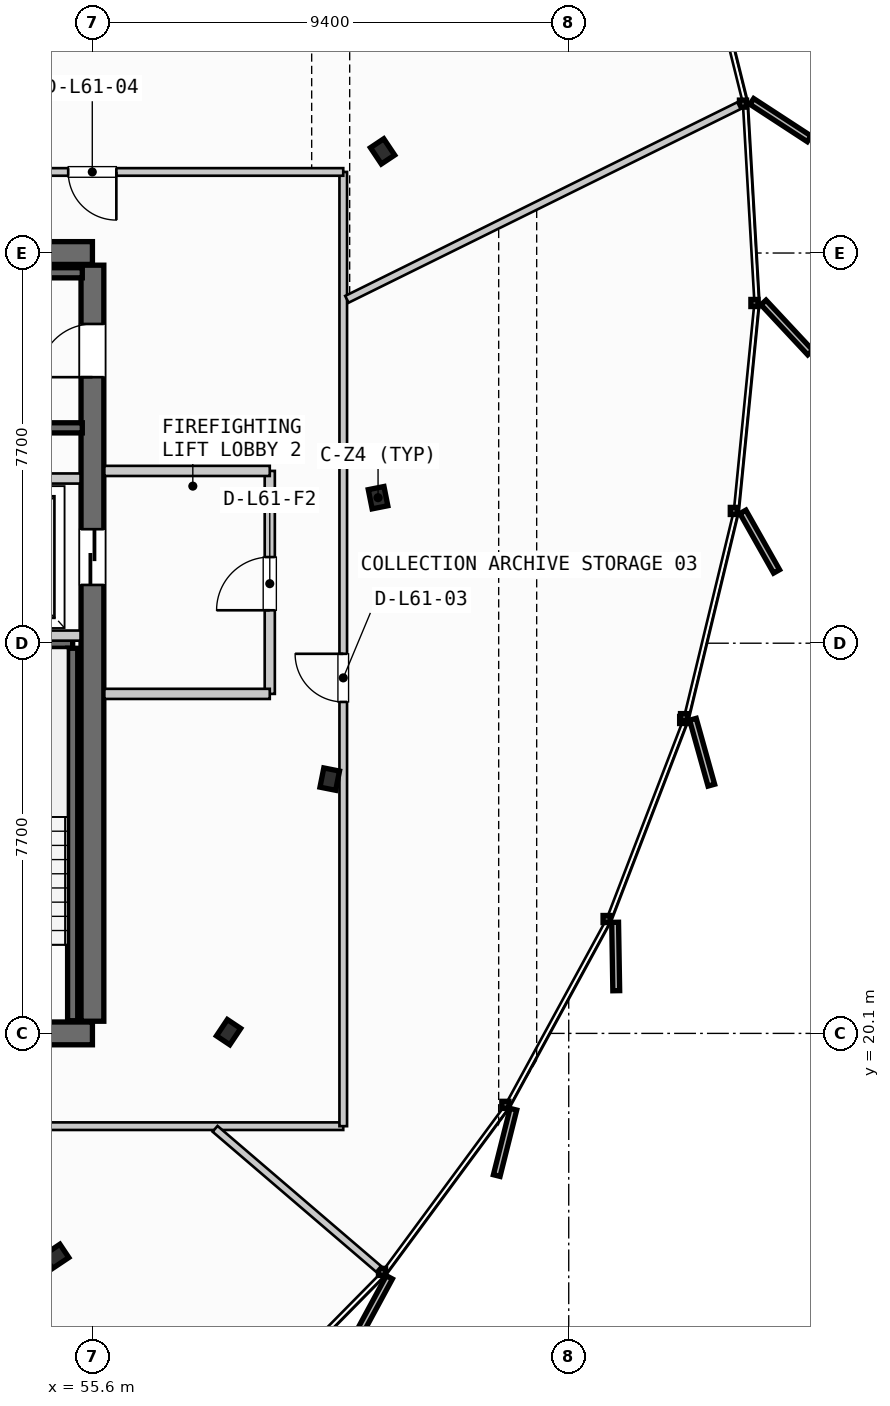
"""IFC4 building model, lengths in metres.
Left out: names, types, materials, properties, quantities, classifications, styles, units other than length and angle.
Written with IfcOpenShell. Run it as: python <this file> out.ifc"""

import sys

from ifc_helpers import new_model, si_unit, direction, frame, frame_2d, origin, origin_2d, place, context, subcontext, project, spatial, rectangle, i_section, extrude, source, transform, mapped, element, fill, save


model = new_model("IFC4")
c1 = context("Model", 3, precision=1e-05, world=origin(), true_north=direction((0.0, 1.0)))
c2 = subcontext(c1, "Body", "Model", "MODEL_VIEW")
j1 = project(units=[si_unit("LENGTHUNIT", "METRE"), si_unit("PLANEANGLEUNIT", "RADIAN")], contexts=[c1])
p1 = place(None, origin())
s1 = spatial("IfcSite", under=j1, at=p1, CompositionType="ELEMENT")
p2 = place(p1, origin())
s2 = spatial("IfcBuilding", under=s1, at=p2, CompositionType="ELEMENT")
p3 = place(p2, frame((0.0, 0.0, 235.3)))
s3 = spatial("IfcBuildingStorey", under=s2, at=p3, CompositionType="ELEMENT", Elevation=235.3)
p4 = place(p3, frame((38.0, 20.1, 0.0), z_axis=(0.0, 0.0, 1.0), x_axis=(1.0, 0.0, 0.0)))
e1 = element("IfcWall", 1, at=p4, inside=s3, PredefinedType="SHEAR", context=c2, shape_type="SweptSolid", body=[
    extrude(rectangle(XDim=17.6, YDim=0.45, at=frame_2d((8.8, 0.0))), origin(), (0.0, 0.0, 1.0), 3.21),
])
p5 = place(p4, frame((1.4, 0.0, 0.0)))
e2 = element("IfcOpeningElement", 2, at=p5, cuts=e1, PredefinedType="OPENING", context=c2, shape_type="SweptSolid", body=[
    extrude(rectangle(XDim=1.05, YDim=2.15, at=frame_2d((0.525, 1.075))), frame((0.0, 0.235, 0.0), z_axis=(0.0, -1.0, 0.0), x_axis=(1.0, 0.0, 0.0)), (0.0, 0.0, 1.0), 0.47),
])
p6 = place(p4, frame((15.15, 0.0, 0.0)))
e3 = element("IfcOpeningElement", 3, at=p6, cuts=e1, PredefinedType="OPENING", context=c2, shape_type="SweptSolid", body=[
    extrude(rectangle(XDim=1.05, YDim=2.15, at=frame_2d((0.525, 1.075))), frame((0.0, 0.235, 0.0), z_axis=(0.0, -1.0, 0.0), x_axis=(1.0, 0.0, 0.0)), (0.0, 0.0, 1.0), 0.47),
])
p7 = place(p4, frame((5.25, 0.0, 0.0)))
e4 = element("IfcOpeningElement", 4, at=p7, cuts=e1, PredefinedType="OPENING", context=c2, shape_type="SweptSolid", body=[
    extrude(rectangle(XDim=0.95, YDim=2.15, at=frame_2d((0.475, 1.075))), frame((0.0, 0.235, 0.0), z_axis=(0.0, -1.0, 0.0), x_axis=(1.0, 0.0, 0.0)), (0.0, 0.0, 1.0), 0.47),
])
p8 = place(p4, frame((11.4, 0.0, 0.0)))
e5 = element("IfcOpeningElement", 5, at=p8, cuts=e1, PredefinedType="OPENING", context=c2, shape_type="SweptSolid", body=[
    extrude(rectangle(XDim=0.95, YDim=2.15, at=frame_2d((0.475, 1.075))), frame((0.0, 0.235, 0.0), z_axis=(0.0, -1.0, 0.0), x_axis=(1.0, 0.0, 0.0)), (0.0, 0.0, 1.0), 0.47),
])
p9 = place(p3, frame((55.6, 35.5, 0.0), z_axis=(0.0, 0.0, 1.0), x_axis=(-1.0, 0.0, 0.0)))
e6 = element("IfcWall", 6, at=p9, inside=s3, PredefinedType="SHEAR", context=c2, shape_type="SweptSolid", body=[
    extrude(rectangle(XDim=17.6, YDim=0.45, at=frame_2d((8.8, 0.0))), origin(), (0.0, 0.0, 1.0), 3.21),
])
p10 = place(p9, frame((8.05, 0.0, 0.0)))
e7 = element("IfcOpeningElement", 7, at=p10, cuts=e6, PredefinedType="OPENING", context=c2, shape_type="SweptSolid", body=[
    extrude(rectangle(XDim=1.5, YDim=2.2, at=frame_2d((0.75, 1.1))), frame((0.0, 0.235, 0.0), z_axis=(0.0, -1.0, 0.0), x_axis=(1.0, 0.0, 0.0)), (0.0, 0.0, 1.0), 0.47),
])
p11 = place(p9, frame((15.85, 0.0, 0.0)))
e8 = element("IfcOpeningElement", 8, at=p11, cuts=e6, PredefinedType="OPENING", context=c2, shape_type="SweptSolid", body=[
    extrude(rectangle(XDim=0.85, YDim=2.15, at=frame_2d((0.425, 1.075))), frame((0.0, 0.235, 0.0), z_axis=(0.0, -1.0, 0.0), x_axis=(1.0, 0.0, 0.0)), (0.0, 0.0, 1.0), 0.47),
])
p12 = place(p9, frame((14.35, 0.0, 0.0)))
e9 = element("IfcOpeningElement", 9, at=p12, cuts=e6, PredefinedType="OPENING", context=c2, shape_type="SweptSolid", body=[
    extrude(rectangle(XDim=0.85, YDim=2.15, at=frame_2d((0.425, 1.075))), frame((0.0, 0.235, 0.0), z_axis=(0.0, -1.0, 0.0), x_axis=(1.0, 0.0, 0.0)), (0.0, 0.0, 1.0), 0.47),
])
p13 = place(p9, frame((12.3, 0.0, 0.0)))
e10 = element("IfcOpeningElement", 10, at=p13, cuts=e6, PredefinedType="OPENING", context=c2, shape_type="SweptSolid", body=[
    extrude(rectangle(XDim=0.95, YDim=2.15, at=frame_2d((0.475, 1.075))), frame((0.0, 0.235, 0.0), z_axis=(0.0, -1.0, 0.0), x_axis=(1.0, 0.0, 0.0)), (0.0, 0.0, 1.0), 0.47),
])
p14 = place(p9, frame((10.2, 0.0, 0.0)))
e11 = element("IfcOpeningElement", 11, at=p14, cuts=e6, PredefinedType="OPENING", context=c2, shape_type="SweptSolid", body=[
    extrude(rectangle(XDim=0.9, YDim=2.15, at=frame_2d((0.45, 1.075))), frame((0.0, 0.235, 0.0), z_axis=(0.0, -1.0, 0.0), x_axis=(1.0, 0.0, 0.0)), (0.0, 0.0, 1.0), 0.47),
])
p15 = place(p3, frame((55.6, 20.34, 0.0), z_axis=(0.0, 0.0, 1.0), x_axis=(0.0, 1.0, 0.0)))
e12 = element("IfcWall", 12, at=p15, inside=s3, PredefinedType="SHEAR", context=c2, shape_type="SweptSolid", body=[
    extrude(rectangle(XDim=14.92, YDim=0.45, at=frame_2d((7.46, 0.0))), origin(), (0.0, 0.0, 1.0), 3.21),
])
p16 = place(p15, frame((12.71, 0.0, 0.0)))
e13 = element("IfcOpeningElement", 13, at=p16, cuts=e12, PredefinedType="OPENING", context=c2, shape_type="SweptSolid", body=[
    extrude(rectangle(XDim=1.05, YDim=2.15, at=frame_2d((0.525, 1.075))), frame((0.0, 0.235, 0.0), z_axis=(0.0, -1.0, 0.0), x_axis=(1.0, 0.0, 0.0)), (0.0, 0.0, 1.0), 0.47),
])
p17 = place(p15, frame((8.61, 0.0, 0.0)))
e14 = element("IfcOpeningElement", 14, at=p17, cuts=e12, PredefinedType="OPENING", context=c2, shape_type="SweptSolid", body=[
    extrude(rectangle(XDim=1.1, YDim=2.2, at=frame_2d((0.55, 1.1))), frame((0.0, 0.235, 0.0), z_axis=(0.0, -1.0, 0.0), x_axis=(1.0, 0.0, 0.0)), (0.0, 0.0, 1.0), 0.47),
])
m1 = source(origin(), c2, "Body", "SweptSolid", [
    extrude(i_section(OverallWidth=0.387, OverallDepth=0.316, WebThickness=0.019, FlangeThickness=0.028, FilletRadius=0.015, at=origin_2d()), origin(), (0.0, 0.0, 1.0), 3.21),
])
for number, where, z_axis, x_axis in (
    (15, (61.237, 30.672, 0.0), (0.0, 0.0, 1.0), (0.981, 0.195, 0.0)),
    (16, (61.326, 37.506, 0.0), (0.0, 0.0, 1.0), (0.831, 0.556, 0.0)),
    (17, (54.885, 15.7, 0.0), (0.0, 0.0, 1.0), (0.556, -0.831, 0.0)),
    (18, (58.287, 20.125, 0.0), (0.0, 0.0, 1.0), (0.831, -0.556, 0.0)),
    (19, (60.284, 25.118, 0.0), (0.0, 0.0, 1.0), (0.981, -0.195, 0.0)),
):
    element("IfcColumn", number, at=place(p3, frame(where, z_axis=z_axis, x_axis=x_axis)), inside=s3, PredefinedType="COLUMN", context=c2, shape_type="MappedRepresentation", body=[
        mapped(m1, transform((0.0, 0.0, 0.0), scale=1.0)),
    ])
p18 = place(p3, frame((52.15, 27.8, 0.0), z_axis=(0.0, 0.0, 1.0), x_axis=(1.0, 0.0, 0.0)))
e20 = element("IfcWall", 20, at=p18, inside=s3, PredefinedType="SHEAR", context=c2, shape_type="SweptSolid", body=[
    extrude(rectangle(XDim=3.06, YDim=0.2, at=frame_2d((1.53, 0.0))), origin(), (0.0, 0.0, 1.0), 3.21),
])
for number, where, z_axis, x_axis in (
    (21, (55.21, 27.7, 0.0), (0.0, 0.0, 1.0), (0.0, -1.0, 0.0)),
    (22, (48.05, 35.11, 0.0), (0.0, 0.0, 1.0), (1.0, 0.0, 0.0)),
    (23, (55.4, 32.05, 0.0), (0.0, 0.0, 1.0), (-1.0, 0.0, 0.0)),
):
    element("IfcWall", number, at=place(p3, frame(where, z_axis=z_axis, x_axis=x_axis)), inside=s3, PredefinedType="SHEAR", context=c2, shape_type="SweptSolid", body=[
        extrude(rectangle(XDim=7.35, YDim=0.2, at=frame_2d((3.675, 0.0))), origin(), (0.0, 0.0, 1.0), 3.21),
    ])
for number, where, z_axis, x_axis in (
    (24, (52.45, 27.95, 0.0), (0.0, 0.0, 1.0), (1.0, 0.0, 0.0)),
    (25, (52.45, 31.05, 0.0), (0.0, 0.0, 1.0), (1.0, 0.0, 0.0)),
):
    element("IfcWall", number, at=place(p3, frame(where, z_axis=z_axis, x_axis=x_axis)), inside=s3, PredefinedType="PARTITIONING", context=c2, shape_type="SweptSolid", body=[
        extrude(rectangle(XDim=2.915, YDim=0.2, at=frame_2d((1.458, 0.0))), origin(), (0.0, 0.0, 1.0), 2.28),
    ])
p19 = place(p3, frame((59.1, 26.8, 0.0), z_axis=(0.0, 0.0, 1.0), x_axis=(0.0, 1.0, 0.0)))
e26 = element("IfcWall", 26, at=p19, inside=s3, PredefinedType="PARTITIONING", context=c2, shape_type="SweptSolid", body=[
    extrude(rectangle(XDim=4.4, YDim=0.2, at=frame_2d((2.2, 0.0))), origin(), (0.0, 0.0, 1.0), 2.28),
])
p20 = place(p19, frame((1.65, 0.0, 0.0)))
e27 = element("IfcOpeningElement", 27, at=p20, cuts=e26, PredefinedType="OPENING", context=c2, shape_type="SweptSolid", body=[
    extrude(rectangle(XDim=1.05, YDim=2.15, at=frame_2d((0.525, 1.075))), frame((0.0, 0.11, 0.0), z_axis=(0.0, -1.0, 0.0), x_axis=(1.0, 0.0, 0.0)), (0.0, 0.0, 1.0), 0.22),
])
for number, where, z_axis, x_axis in (
    (28, (55.835, 26.8, 0.0), (0.0, 0.0, 1.0), (1.0, 0.0, 0.0)),
    (29, (55.835, 31.2, 0.0), (0.0, 0.0, 1.0), (1.0, 0.0, 0.0)),
):
    element("IfcWall", number, at=place(p3, frame(where, z_axis=z_axis, x_axis=x_axis)), inside=s3, PredefinedType="PARTITIONING", context=c2, shape_type="SweptSolid", body=[
        extrude(rectangle(XDim=3.265, YDim=0.2, at=frame_2d((1.633, 0.0))), origin(), (0.0, 0.0, 1.0), 2.28),
    ])
p21 = place(p3, frame((31.68, 18.269, 0.0), z_axis=(0.0, 0.0, 1.0), x_axis=(1.0, 0.0, 0.0)))
e30 = element("IfcWall", 30, at=p21, inside=s3, PredefinedType="PARTITIONING", context=c2, shape_type="SweptSolid", body=[
    extrude(rectangle(XDim=28.87, YDim=0.15, at=frame_2d((14.435, 0.0))), origin(), (0.0, 0.0, 1.0), 2.28),
])
p22 = place(p21, frame((6.083, 0.0, 0.0)))
e31 = element("IfcOpeningElement", 31, at=p22, cuts=e30, PredefinedType="OPENING", context=c2, shape_type="SweptSolid", body=[
    extrude(rectangle(XDim=0.95, YDim=2.15, at=frame_2d((0.475, 1.075))), frame((0.0, 0.085, 0.0), z_axis=(0.0, -1.0, 0.0), x_axis=(1.0, 0.0, 0.0)), (0.0, 0.0, 1.0), 0.17),
])
p23 = place(p21, frame((19.003, 0.0, 0.0)))
e32 = element("IfcOpeningElement", 32, at=p23, cuts=e30, PredefinedType="OPENING", context=c2, shape_type="SweptSolid", body=[
    extrude(rectangle(XDim=0.95, YDim=2.15, at=frame_2d((0.475, 1.075))), frame((0.0, 0.085, 0.0), z_axis=(0.0, -1.0, 0.0), x_axis=(1.0, 0.0, 0.0)), (0.0, 0.0, 1.0), 0.17),
])
p24 = place(p3, frame((60.55, 18.269, 0.0), z_axis=(0.0, 0.0, 1.0), x_axis=(0.0, 1.0, 0.0)))
e33 = element("IfcWall", 33, at=p24, inside=s3, PredefinedType="PARTITIONING", context=c2, shape_type="SweptSolid", body=[
    extrude(rectangle(XDim=18.831, YDim=0.15, at=frame_2d((9.416, 0.0))), origin(), (0.0, 0.0, 1.0), 2.28),
])
p25 = place(p24, frame((8.372, 0.0, 0.0)))
e34 = element("IfcOpeningElement", 34, at=p25, cuts=e33, PredefinedType="OPENING", context=c2, shape_type="SweptSolid", body=[
    extrude(rectangle(XDim=0.95, YDim=2.15, at=frame_2d((0.475, 1.075))), frame((0.0, 0.085, 0.0), z_axis=(0.0, -1.0, 0.0), x_axis=(1.0, 0.0, 0.0)), (0.0, 0.0, 1.0), 0.17),
])
p26 = place(p3, frame((60.55, 37.1, 0.0), z_axis=(0.0, 0.0, 1.0), x_axis=(-1.0, 0.0, 0.0)))
e35 = element("IfcWall", 35, at=p26, inside=s3, PredefinedType="PARTITIONING", context=c2, shape_type="SweptSolid", body=[
    extrude(rectangle(XDim=28.87, YDim=0.15, at=frame_2d((14.435, 0.0))), origin(), (0.0, 0.0, 1.0), 2.28),
])
p27 = place(p26, frame((4.478, 0.0, 0.0)))
e36 = element("IfcOpeningElement", 36, at=p27, cuts=e35, PredefinedType="OPENING", context=c2, shape_type="SweptSolid", body=[
    extrude(rectangle(XDim=0.95, YDim=2.15, at=frame_2d((0.475, 1.075))), frame((0.0, 0.085, 0.0), z_axis=(0.0, -1.0, 0.0), x_axis=(1.0, 0.0, 0.0)), (0.0, 0.0, 1.0), 0.17),
])
p28 = place(p26, frame((13.236, 0.0, 0.0)))
e37 = element("IfcOpeningElement", 37, at=p28, cuts=e35, PredefinedType="OPENING", context=c2, shape_type="SweptSolid", body=[
    extrude(rectangle(XDim=0.95, YDim=2.15, at=frame_2d((0.475, 1.075))), frame((0.0, 0.085, 0.0), z_axis=(0.0, -1.0, 0.0), x_axis=(1.0, 0.0, 0.0)), (0.0, 0.0, 1.0), 0.17),
])
p29 = place(p26, frame((22.719, 0.0, 0.0)))
e38 = element("IfcOpeningElement", 38, at=p29, cuts=e35, PredefinedType="OPENING", context=c2, shape_type="SweptSolid", body=[
    extrude(rectangle(XDim=0.95, YDim=2.15, at=frame_2d((0.475, 1.075))), frame((0.0, 0.085, 0.0), z_axis=(0.0, -1.0, 0.0), x_axis=(1.0, 0.0, 0.0)), (0.0, 0.0, 1.0), 0.17),
])
p30 = place(p3, frame((58.02, 18.217, 0.0), z_axis=(0.0, 0.0, 1.0), x_axis=(0.759390413893, -0.650635227518, 0.0)))
e39 = element("IfcWall", 39, at=p30, inside=s3, PredefinedType="PARTITIONING", context=c2, shape_type="SweptSolid", body=[
    extrude(rectangle(XDim=4.25, YDim=0.15, at=frame_2d((2.125, 0.0))), origin(), (0.0, 0.0, 1.0), 2.28),
])
p31 = place(p3, frame((60.622, 34.586, 0.0), z_axis=(0.0, 0.0, 1.0), x_axis=(0.896583813204, 0.442874097122, 0.0)))
e40 = element("IfcWall", 40, at=p31, inside=s3, PredefinedType="PARTITIONING", context=c2, shape_type="SweptSolid", body=[
    extrude(rectangle(XDim=8.629, YDim=0.15, at=frame_2d((4.315, 0.0))), origin(), (0.0, 0.0, 1.0), 2.28),
])
p32 = place(p3, frame((51.259, 37.172, 0.0), z_axis=(0.0, 0.0, 1.0), x_axis=(0.431686362639, 0.902023771478, 0.0)))
e41 = element("IfcWall", 41, at=p32, inside=s3, PredefinedType="PARTITIONING", context=c2, shape_type="SweptSolid", body=[
    extrude(rectangle(XDim=14.705, YDim=0.15, at=frame_2d((7.353, 0.0))), origin(), (0.0, 0.0, 1.0), 2.28),
])
m2 = source(origin(), c2, "Body", "SweptSolid", [
    extrude(rectangle(XDim=1.05, YDim=2.15, at=frame_2d((0.525, 1.075))), frame((0.0, 0.025, 0.0), z_axis=(0.0, -1.0, 0.0), x_axis=(1.0, 0.0, 0.0)), (0.0, 0.0, 1.0), 0.05),
])
p33 = place(p16, origin())
e42 = element("IfcDoor", 42, at=p33, inside=s3, OperationType="SINGLE_SWING_LEFT", PredefinedType="DOOR", context=c2, shape_type="MappedRepresentation", body=[
    mapped(m2, transform((0.0, 0.0, 0.0), scale=1.0)),
])
fill(e13, e42)
m3 = source(origin(), c2, "Body", "SweptSolid", [
    extrude(rectangle(XDim=1.1, YDim=2.2, at=frame_2d((0.55, 1.1))), frame((0.0, 0.025, 0.0), z_axis=(0.0, -1.0, 0.0), x_axis=(1.0, 0.0, 0.0)), (0.0, 0.0, 1.0), 0.05),
])
p34 = place(p17, origin())
e43 = element("IfcDoor", 43, at=p34, inside=s3, OperationType="SLIDING_TO_RIGHT", PredefinedType="DOOR", context=c2, shape_type="MappedRepresentation", body=[
    mapped(m3, transform((0.0, 0.0, 0.0), scale=1.0)),
])
fill(e14, e43)
p35 = place(p20, origin())
e44 = element("IfcDoor", 44, at=p35, inside=s3, OperationType="SINGLE_SWING_LEFT", PredefinedType="DOOR", context=c2, shape_type="MappedRepresentation", body=[
    mapped(m2, transform((0.0, 0.0, 0.0), scale=1.0)),
])
fill(e27, e44)
m4 = source(origin(), c2, "Body", "SweptSolid", [
    extrude(rectangle(XDim=0.95, YDim=2.15, at=frame_2d((0.475, 1.075))), frame((0.0, 0.025, 0.0), z_axis=(0.0, -1.0, 0.0), x_axis=(1.0, 0.0, 0.0)), (0.0, 0.0, 1.0), 0.05),
])
p36 = place(p25, origin())
e45 = element("IfcDoor", 45, at=p36, inside=s3, OperationType="SINGLE_SWING_RIGHT", PredefinedType="DOOR", context=c2, shape_type="MappedRepresentation", body=[
    mapped(m4, transform((0.0, 0.0, 0.0), scale=1.0)),
])
fill(e34, e45)
p37 = place(p27, origin())
e46 = element("IfcDoor", 46, at=p37, inside=s3, OperationType="SINGLE_SWING_LEFT", PredefinedType="DOOR", context=c2, shape_type="MappedRepresentation", body=[
    mapped(m4, transform((0.0, 0.0, 0.0), scale=1.0)),
])
fill(e36, e46)
save(model, sys.argv[1])
